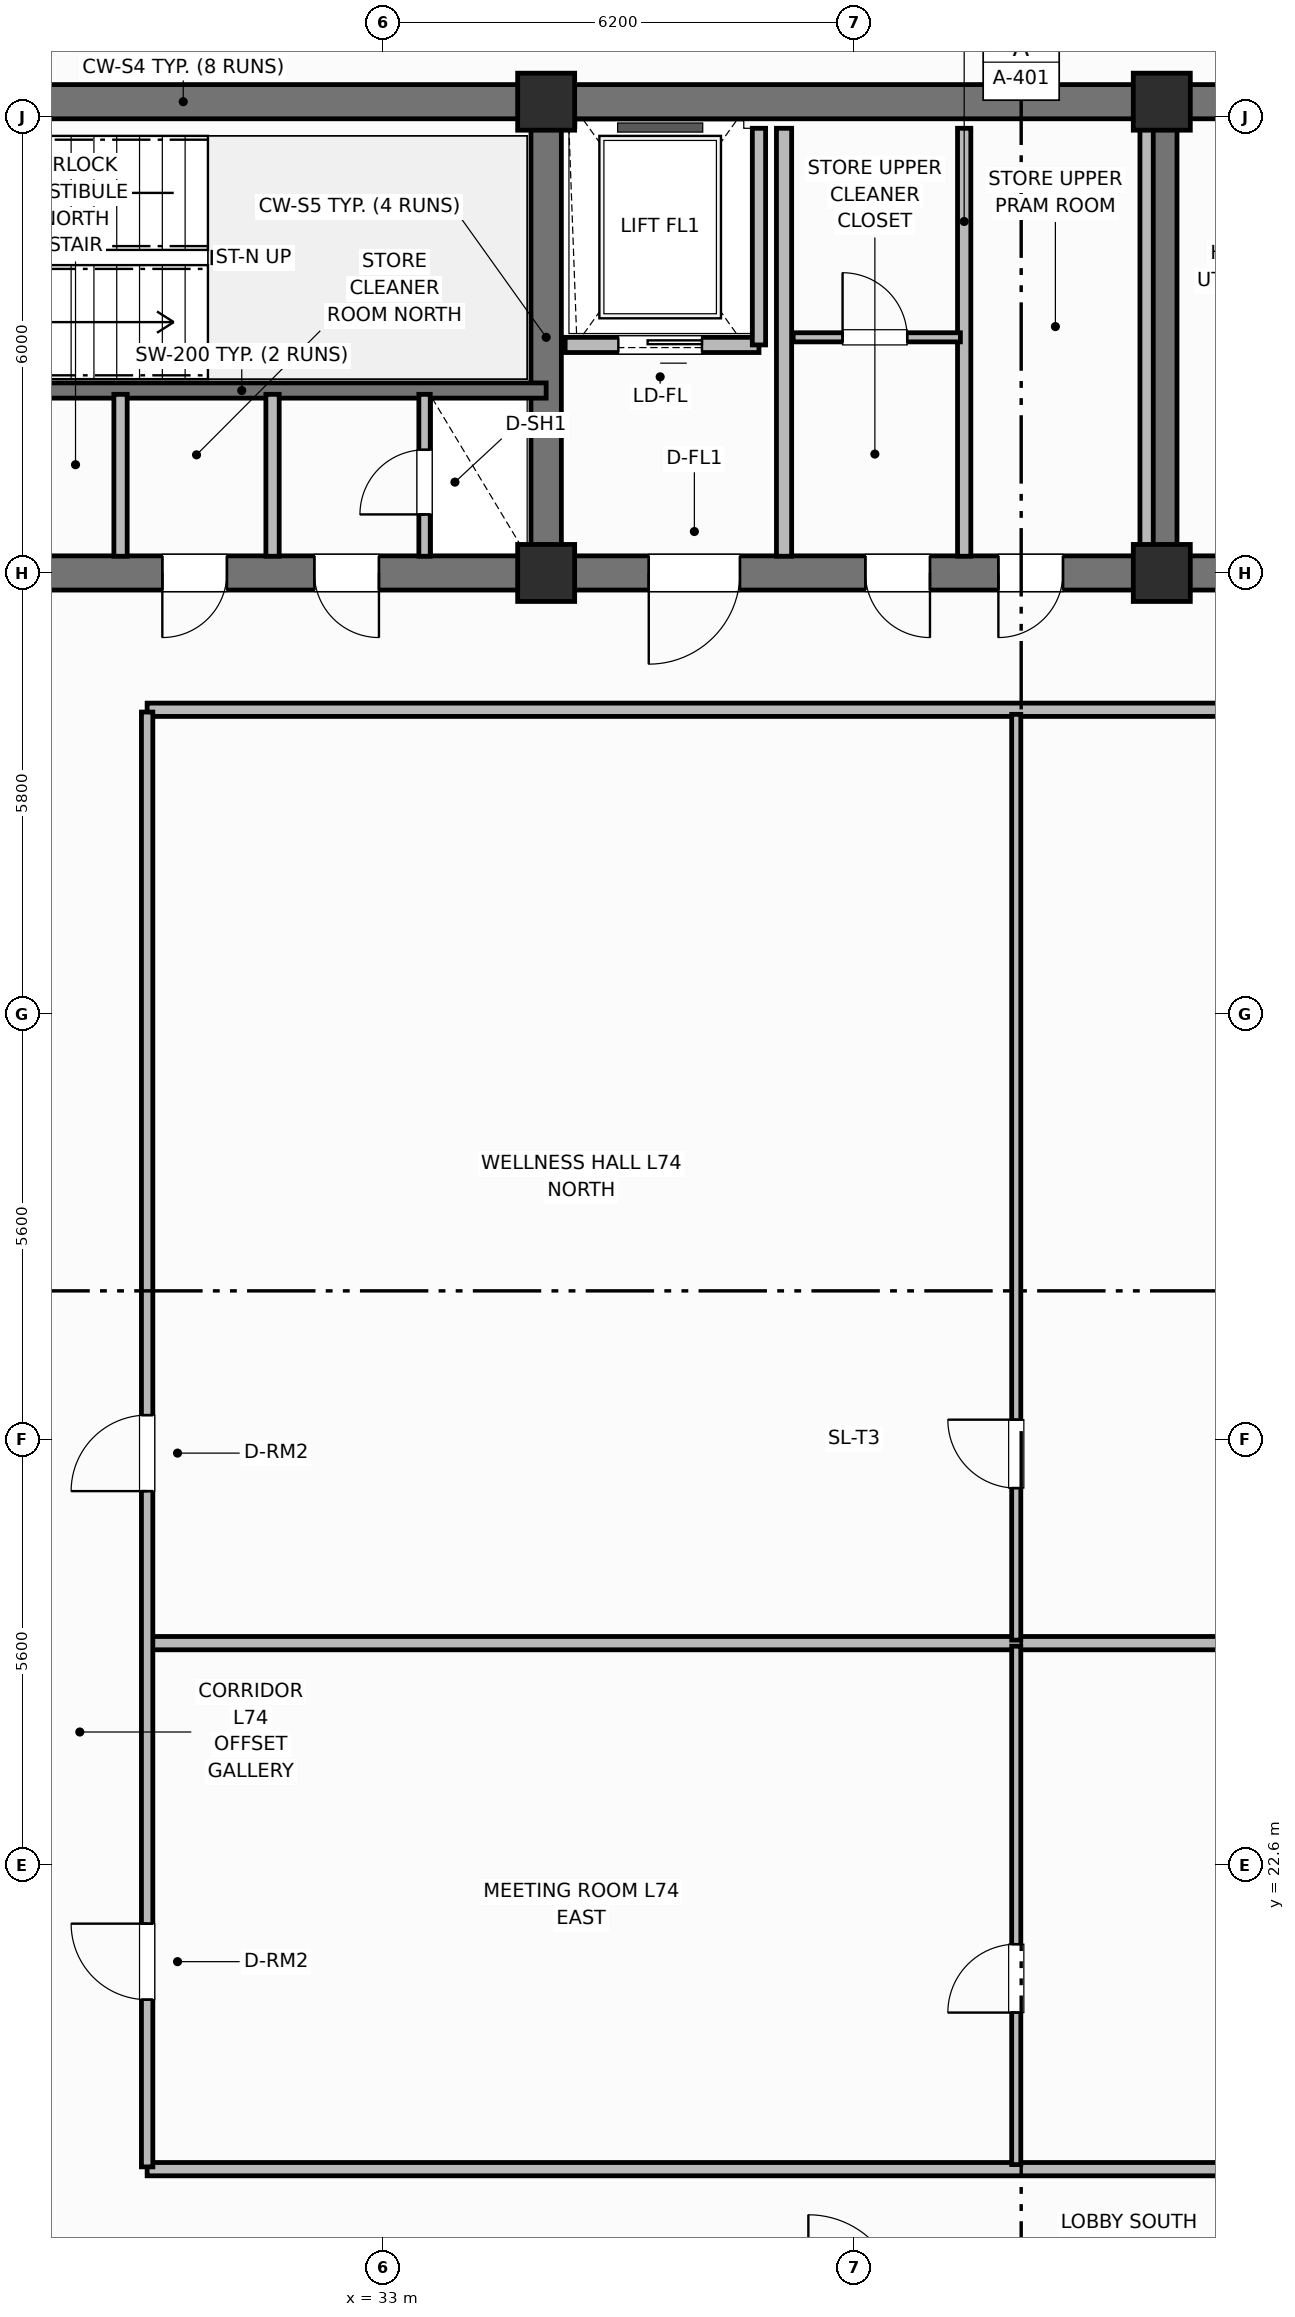
"""IFC4 building model, lengths in metres.
Left out: names, types, materials, properties, quantities, classifications, styles, units other than length and angle.
Written with IfcOpenShell. Run it as: python <this file> out.ifc"""

import sys

from ifc_helpers import new_model, si_unit, direction, frame, frame_2d, origin, origin_2d, place, context, subcontext, project, spatial, rectangle, extrude, element, fill, save


model = new_model("IFC4")
c1 = context("Model", 3, precision=1e-05, world=origin(), true_north=direction((0.0, 1.0)))
c2 = subcontext(c1, "Body", "Model", "MODEL_VIEW")
j1 = project(units=[si_unit("LENGTHUNIT", "METRE"), si_unit("PLANEANGLEUNIT", "RADIAN")], contexts=[c1])
p1 = place(None, origin())
s1 = spatial("IfcSite", under=j1, at=p1, CompositionType="ELEMENT")
p2 = place(p1, origin())
s2 = spatial("IfcBuilding", under=s1, at=p2, CompositionType="ELEMENT")
p3 = place(p2, frame((0.0, 0.0, 293.5)))
s3 = spatial("IfcBuildingStorey", under=s2, at=p3, CompositionType="ELEMENT", Elevation=293.5)
p4 = place(p3, frame((25.6, 45.8, 0.0), z_axis=(0.0, 0.0, 1.0), x_axis=(1.0, 0.0, 0.0)))
e1 = element("IfcWall", 1, at=p4, inside=s3, PredefinedType="SHEAR", context=c2, shape_type="SweptSolid", body=[
    extrude(rectangle(XDim=27.2, YDim=0.45, at=frame_2d((13.6, 0.0))), origin(), (0.0, 0.0, 1.0), 3.7),
])
p5 = place(p3, frame((52.8, 39.6, 0.0), z_axis=(0.0, 0.0, 1.0), x_axis=(-1.0, 0.0, 0.0)))
e2 = element("IfcWall", 2, at=p5, inside=s3, PredefinedType="SHEAR", context=c2, shape_type="SweptSolid", body=[
    extrude(rectangle(XDim=27.2, YDim=0.45, at=frame_2d((13.6, 0.0))), origin(), (0.0, 0.0, 1.0), 3.7),
])
p6 = place(p5, frame((24.3, 0.0, 0.0)))
e3 = element("IfcOpeningElement", 3, at=p6, cuts=e2, PredefinedType="OPENING", context=c2, shape_type="SweptSolid", body=[
    extrude(rectangle(XDim=1.1, YDim=2.15, at=frame_2d((0.55, 1.075))), frame((0.0, 0.235, 0.0), z_axis=(0.0, -1.0, 0.0), x_axis=(1.0, 0.0, 0.0)), (0.0, 0.0, 1.0), 0.47),
])
p7 = place(p5, frame((21.85, 0.0, 0.0)))
e4 = element("IfcOpeningElement", 4, at=p7, cuts=e2, PredefinedType="OPENING", context=c2, shape_type="SweptSolid", body=[
    extrude(rectangle(XDim=0.85, YDim=2.1, at=frame_2d((0.425, 1.05))), frame((0.0, 0.235, 0.0), z_axis=(0.0, -1.0, 0.0), x_axis=(1.0, 0.0, 0.0)), (0.0, 0.0, 1.0), 0.47),
])
p8 = place(p5, frame((19.85, 0.0, 0.0)))
e5 = element("IfcOpeningElement", 5, at=p8, cuts=e2, PredefinedType="OPENING", context=c2, shape_type="SweptSolid", body=[
    extrude(rectangle(XDim=0.85, YDim=2.1, at=frame_2d((0.425, 1.05))), frame((0.0, 0.235, 0.0), z_axis=(0.0, -1.0, 0.0), x_axis=(1.0, 0.0, 0.0)), (0.0, 0.0, 1.0), 0.47),
])
p9 = place(p5, frame((15.1, 0.0, 0.0)))
e6 = element("IfcOpeningElement", 6, at=p9, cuts=e2, PredefinedType="OPENING", context=c2, shape_type="SweptSolid", body=[
    extrude(rectangle(XDim=1.2, YDim=2.15, at=frame_2d((0.6, 1.075))), frame((0.0, 0.235, 0.0), z_axis=(0.0, -1.0, 0.0), x_axis=(1.0, 0.0, 0.0)), (0.0, 0.0, 1.0), 0.47),
])
p10 = place(p5, frame((12.6, 0.0, 0.0)))
e7 = element("IfcOpeningElement", 7, at=p10, cuts=e2, PredefinedType="OPENING", context=c2, shape_type="SweptSolid", body=[
    extrude(rectangle(XDim=0.85, YDim=2.1, at=frame_2d((0.425, 1.05))), frame((0.0, 0.235, 0.0), z_axis=(0.0, -1.0, 0.0), x_axis=(1.0, 0.0, 0.0)), (0.0, 0.0, 1.0), 0.47),
])
p11 = place(p5, frame((10.85, 0.0, 0.0)))
e8 = element("IfcOpeningElement", 8, at=p11, cuts=e2, PredefinedType="OPENING", context=c2, shape_type="SweptSolid", body=[
    extrude(rectangle(XDim=0.85, YDim=2.1, at=frame_2d((0.425, 1.05))), frame((0.0, 0.235, 0.0), z_axis=(0.0, -1.0, 0.0), x_axis=(1.0, 0.0, 0.0)), (0.0, 0.0, 1.0), 0.47),
])
p12 = place(p5, frame((7.35, 0.0, 0.0)))
e9 = element("IfcOpeningElement", 9, at=p12, cuts=e2, PredefinedType="OPENING", context=c2, shape_type="SweptSolid", body=[
    extrude(rectangle(XDim=0.85, YDim=2.1, at=frame_2d((0.425, 1.05))), frame((0.0, 0.235, 0.0), z_axis=(0.0, -1.0, 0.0), x_axis=(1.0, 0.0, 0.0)), (0.0, 0.0, 1.0), 0.47),
])
p13 = place(p5, frame((4.2, 0.0, 0.0)))
e10 = element("IfcOpeningElement", 10, at=p13, cuts=e2, PredefinedType="OPENING", context=c2, shape_type="SweptSolid", body=[
    extrude(rectangle(XDim=1.3, YDim=2.2, at=frame_2d((0.65, 1.1))), frame((0.0, 0.235, 0.0), z_axis=(0.0, -1.0, 0.0), x_axis=(1.0, 0.0, 0.0)), (0.0, 0.0, 1.0), 0.47),
])
for number, where, z_axis, x_axis in (
    (11, (35.15, 39.825, 0.0), (0.0, 0.0, 1.0), (0.0, 1.0, 0.0)),
    (12, (43.25, 39.825, 0.0), (0.0, 0.0, 1.0), (0.0, 1.0, 0.0)),
):
    element("IfcWall", number, at=place(p3, frame(where, z_axis=z_axis, x_axis=x_axis)), inside=s3, PredefinedType="SHEAR", context=c2, shape_type="SweptSolid", body=[
        extrude(rectangle(XDim=5.75, YDim=0.4, at=frame_2d((2.875, 0.0))), origin(), (0.0, 0.0, 1.0), 3.7),
    ])
for number, where, z_axis, x_axis in (
    (13, (35.15, 39.6, 0.0), (0.0, 0.0, 1.0), (1.0, 0.0, 0.0)),
    (14, (35.15, 45.8, 0.0), (0.0, 0.0, 1.0), (1.0, 0.0, 0.0)),
    (15, (43.25, 39.6, 0.0), (0.0, 0.0, 1.0), (1.0, 0.0, 0.0)),
    (16, (43.25, 45.8, 0.0), (0.0, 0.0, 1.0), (1.0, 0.0, 0.0)),
):
    element("IfcColumn", number, at=place(p3, frame(where, z_axis=z_axis, x_axis=x_axis)), inside=s3, PredefinedType="COLUMN", context=c2, shape_type="SweptSolid", body=[
        extrude(rectangle(XDim=0.75, YDim=0.75, at=origin_2d()), origin(), (0.0, 0.0, 1.0), 3.7),
    ])
p14 = place(p3, frame((35.15, 42.0, 0.0), z_axis=(0.0, 0.0, 1.0), x_axis=(-1.0, 0.0, 0.0)))
e17 = element("IfcWall", 17, at=p14, inside=s3, PredefinedType="SHEAR", context=c2, shape_type="SweptSolid", body=[
    extrude(rectangle(XDim=9.55, YDim=0.2, at=frame_2d((4.775, 0.0))), origin(), (0.0, 0.0, 1.0), 3.7),
])
p15 = place(p14, frame((7.25, 0.0, 0.0)))
e18 = element("IfcOpeningElement", 18, at=p15, cuts=e17, PredefinedType="OPENING", context=c2, shape_type="SweptSolid", body=[
    extrude(rectangle(XDim=1.1, YDim=2.15, at=frame_2d((0.55, 1.075))), frame((0.0, 0.11, 0.0), z_axis=(0.0, -1.0, 0.0), x_axis=(1.0, 0.0, 0.0)), (0.0, 0.0, 1.0), 0.22),
])
p16 = place(p3, frame((33.55, 39.82, 0.0), z_axis=(0.0, 0.0, 1.0), x_axis=(0.0, 1.0, 0.0)))
e19 = element("IfcWall", 19, at=p16, inside=s3, PredefinedType="PARTITIONING", context=c2, shape_type="SweptSolid", body=[
    extrude(rectangle(XDim=2.13, YDim=0.15, at=frame_2d((1.065, 0.0))), origin(), (0.0, 0.0, 1.0), 2.54),
])
p17 = place(p16, frame((0.55, 0.0, 0.0)))
e20 = element("IfcOpeningElement", 20, at=p17, cuts=e19, PredefinedType="OPENING", context=c2, shape_type="SweptSolid", body=[
    extrude(rectangle(XDim=0.85, YDim=2.05, at=frame_2d((0.425, 1.025))), frame((0.0, 0.085, 0.0), z_axis=(0.0, -1.0, 0.0), x_axis=(1.0, 0.0, 0.0)), (0.0, 0.0, 1.0), 0.17),
])
for number, where, z_axis, x_axis in (
    (21, (29.55, 39.82, 0.0), (0.0, 0.0, 1.0), (0.0, 1.0, 0.0)),
    (22, (31.55, 39.82, 0.0), (0.0, 0.0, 1.0), (0.0, 1.0, 0.0)),
):
    element("IfcWall", number, at=place(p3, frame(where, z_axis=z_axis, x_axis=x_axis)), inside=s3, PredefinedType="PARTITIONING", context=c2, shape_type="SweptSolid", body=[
        extrude(rectangle(XDim=2.13, YDim=0.175, at=frame_2d((1.065, 0.0))), origin(), (0.0, 0.0, 1.0), 2.54),
    ])
p18 = place(p3, frame((37.95, 42.6, 0.0), z_axis=(0.0, 0.0, 1.0), x_axis=(-1.0, 0.0, 0.0)))
e23 = element("IfcWall", 23, at=p18, inside=s3, PredefinedType="PARTITIONING", context=c2, shape_type="SweptSolid", body=[
    extrude(rectangle(XDim=2.55, YDim=0.2, at=frame_2d((1.275, 0.0))), origin(), (0.0, 0.0, 1.0), 2.31),
])
p19 = place(p18, frame((0.75, 0.0, 0.0)))
e24 = element("IfcOpeningElement", 24, at=p19, cuts=e23, PredefinedType="OPENING", context=c2, shape_type="SweptSolid", body=[
    extrude(rectangle(XDim=1.1, YDim=2.15, at=frame_2d((0.55, 1.075))), frame((0.0, 0.11, 0.0), z_axis=(0.0, -1.0, 0.0), x_axis=(1.0, 0.0, 0.0)), (0.0, 0.0, 1.0), 0.22),
])
p20 = place(p3, frame((37.95, 42.6, 0.0), z_axis=(0.0, 0.0, 1.0), x_axis=(0.0, 1.0, 0.0)))
e25 = element("IfcWall", 25, at=p20, inside=s3, PredefinedType="PARTITIONING", context=c2, shape_type="SweptSolid", body=[
    extrude(rectangle(XDim=2.85, YDim=0.175, at=frame_2d((1.425, 0.0))), origin(), (0.0, 0.0, 1.0), 2.54),
])
p21 = place(p3, frame((38.28, 39.82, 0.0), z_axis=(0.0, 0.0, 1.0), x_axis=(0.0, 1.0, 0.0)))
e26 = element("IfcWall", 26, at=p21, inside=s3, PredefinedType="PARTITIONING", context=c2, shape_type="SweptSolid", body=[
    extrude(rectangle(XDim=5.63, YDim=0.2, at=frame_2d((2.815, 0.0))), origin(), (0.0, 0.0, 1.0), 2.54),
])
for number, where, z_axis, x_axis in (
    (27, (43.05, 39.82, 0.0), (0.0, 0.0, 1.0), (0.0, 1.0, 0.0)),
    (28, (40.65, 39.82, 0.0), (0.0, 0.0, 1.0), (0.0, 1.0, 0.0)),
):
    element("IfcWall", number, at=place(p3, frame(where, z_axis=z_axis, x_axis=x_axis)), inside=s3, PredefinedType="PARTITIONING", context=c2, shape_type="SweptSolid", body=[
        extrude(rectangle(XDim=5.63, YDim=0.175, at=frame_2d((2.815, 0.0))), origin(), (0.0, 0.0, 1.0), 2.54),
    ])
p22 = place(p3, frame((38.4, 42.7, 0.0), z_axis=(0.0, 0.0, 1.0), x_axis=(1.0, 0.0, 0.0)))
e29 = element("IfcWall", 29, at=p22, inside=s3, PredefinedType="PARTITIONING", context=c2, shape_type="SweptSolid", body=[
    extrude(rectangle(XDim=2.2, YDim=0.12, at=frame_2d((1.1, 0.0))), origin(), (0.0, 0.0, 1.0), 2.31),
])
p23 = place(p22, frame((0.65, 0.0, 0.0)))
e30 = element("IfcOpeningElement", 30, at=p23, cuts=e29, PredefinedType="OPENING", context=c2, shape_type="SweptSolid", body=[
    extrude(rectangle(XDim=0.85, YDim=2.1, at=frame_2d((0.425, 1.05))), frame((0.0, 0.07, 0.0), z_axis=(0.0, -1.0, 0.0), x_axis=(1.0, 0.0, 0.0)), (0.0, 0.0, 1.0), 0.14),
])
for number, where, z_axis, x_axis in (
    (31, (29.9, 18.6, 0.0), (0.0, 0.0, 1.0), (1.0, 0.0, 0.0)),
    (32, (29.9, 37.8, 0.0), (0.0, 0.0, 1.0), (1.0, 0.0, 0.0)),
):
    element("IfcWall", number, at=place(p3, frame(where, z_axis=z_axis, x_axis=x_axis)), inside=s3, PredefinedType="PARTITIONING", context=c2, shape_type="SweptSolid", body=[
        extrude(rectangle(XDim=22.95, YDim=0.175, at=frame_2d((11.475, 0.0))), origin(), (0.0, 0.0, 1.0), 2.54),
    ])
p24 = place(p3, frame((29.93, 25.521, 0.0), z_axis=(0.0, 0.0, 1.0), x_axis=(1.0, 0.0, 0.0)))
e33 = element("IfcWall", 33, at=p24, inside=s3, PredefinedType="PARTITIONING", context=c2, shape_type="SweptSolid", body=[
    extrude(rectangle(XDim=22.87, YDim=0.175, at=frame_2d((11.435, 0.0))), origin(), (0.0, 0.0, 1.0), 2.54),
])
p25 = place(p3, frame((41.335, 18.66, 0.0), z_axis=(0.0, 0.0, 1.0), x_axis=(0.0, 1.0, 0.0)))
e34 = element("IfcWall", 34, at=p25, inside=s3, PredefinedType="PARTITIONING", context=c2, shape_type="SweptSolid", body=[
    extrude(rectangle(XDim=6.821, YDim=0.12, at=frame_2d((3.41, 0.0))), origin(), (0.0, 0.0, 1.0), 2.54),
])
p26 = place(p25, frame((2.0, 0.0, 0.0)))
e35 = element("IfcOpeningElement", 35, at=p26, cuts=e34, PredefinedType="OPENING", context=c2, shape_type="SweptSolid", body=[
    extrude(rectangle(XDim=0.9, YDim=2.1, at=frame_2d((0.45, 1.05))), frame((0.0, 0.07, 0.0), z_axis=(0.0, -1.0, 0.0), x_axis=(1.0, 0.0, 0.0)), (0.0, 0.0, 1.0), 0.14),
])
p27 = place(p3, frame((41.335, 25.56, 0.0), z_axis=(0.0, 0.0, 1.0), x_axis=(0.0, 1.0, 0.0)))
e36 = element("IfcWall", 36, at=p27, inside=s3, PredefinedType="PARTITIONING", context=c2, shape_type="SweptSolid", body=[
    extrude(rectangle(XDim=12.18, YDim=0.12, at=frame_2d((6.09, 0.0))), origin(), (0.0, 0.0, 1.0), 2.54),
])
p28 = place(p27, frame((2.0, 0.0, 0.0)))
e37 = element("IfcOpeningElement", 37, at=p28, cuts=e36, PredefinedType="OPENING", context=c2, shape_type="SweptSolid", body=[
    extrude(rectangle(XDim=0.9, YDim=2.1, at=frame_2d((0.45, 1.05))), frame((0.0, 0.07, 0.0), z_axis=(0.0, -1.0, 0.0), x_axis=(1.0, 0.0, 0.0)), (0.0, 0.0, 1.0), 0.14),
])
p29 = place(p3, frame((29.9, 18.63, 0.0), z_axis=(0.0, 0.0, 1.0), x_axis=(0.0, 1.0, 0.0)))
e38 = element("IfcWall", 38, at=p29, inside=s3, PredefinedType="PARTITIONING", context=c2, shape_type="SweptSolid", body=[
    extrude(rectangle(XDim=19.14, YDim=0.15, at=frame_2d((9.57, 0.0))), origin(), (0.0, 0.0, 1.0), 2.54),
])
p30 = place(p29, frame((2.2, 0.0, 0.0)))
e39 = element("IfcOpeningElement", 39, at=p30, cuts=e38, PredefinedType="OPENING", context=c2, shape_type="SweptSolid", body=[
    extrude(rectangle(XDim=1.0, YDim=2.15, at=frame_2d((0.5, 1.075))), frame((0.0, 0.085, 0.0), z_axis=(0.0, -1.0, 0.0), x_axis=(1.0, 0.0, 0.0)), (0.0, 0.0, 1.0), 0.17),
])
p31 = place(p29, frame((8.89, 0.0, 0.0)))
e40 = element("IfcOpeningElement", 40, at=p31, cuts=e38, PredefinedType="OPENING", context=c2, shape_type="SweptSolid", body=[
    extrude(rectangle(XDim=1.0, YDim=2.15, at=frame_2d((0.5, 1.075))), frame((0.0, 0.085, 0.0), z_axis=(0.0, -1.0, 0.0), x_axis=(1.0, 0.0, 0.0)), (0.0, 0.0, 1.0), 0.17),
])
p32 = place(p17, origin())
e41 = element("IfcDoor", 41, at=p32, inside=s3, OperationType="SINGLE_SWING_LEFT", PredefinedType="TRAPDOOR", context=c2, shape_type="SweptSolid", body=[
    extrude(rectangle(XDim=0.85, YDim=2.05, at=frame_2d((0.425, 1.025))), frame((0.0, 0.025, 0.0), z_axis=(0.0, -1.0, 0.0), x_axis=(1.0, 0.0, 0.0)), (0.0, 0.0, 1.0), 0.05),
])
fill(e20, e41)
p33 = place(p19, origin())
e42 = element("IfcDoor", 42, at=p33, inside=s3, OperationType="SLIDING_TO_LEFT", PredefinedType="DOOR", context=c2, shape_type="SweptSolid", body=[
    extrude(rectangle(XDim=1.1, YDim=2.15, at=frame_2d((0.55, 1.075))), frame((0.0, 0.025, 0.0), z_axis=(0.0, -1.0, 0.0), x_axis=(1.0, 0.0, 0.0)), (0.0, 0.0, 1.0), 0.05),
])
fill(e24, e42)
p34 = place(p23, origin())
e43 = element("IfcDoor", 43, at=p34, inside=s3, OperationType="SINGLE_SWING_LEFT", PredefinedType="DOOR", context=c2, shape_type="SweptSolid", body=[
    extrude(rectangle(XDim=0.85, YDim=2.1, at=frame_2d((0.425, 1.05))), frame((0.0, 0.025, 0.0), z_axis=(0.0, -1.0, 0.0), x_axis=(1.0, 0.0, 0.0)), (0.0, 0.0, 1.0), 0.05),
])
fill(e30, e43)
p35 = place(p26, origin())
e44 = element("IfcDoor", 44, at=p35, inside=s3, OperationType="SINGLE_SWING_LEFT", PredefinedType="DOOR", context=c2, shape_type="SweptSolid", body=[
    extrude(rectangle(XDim=0.9, YDim=2.1, at=frame_2d((0.45, 1.05))), frame((0.0, 0.025, 0.0), z_axis=(0.0, -1.0, 0.0), x_axis=(1.0, 0.0, 0.0)), (0.0, 0.0, 1.0), 0.05),
])
fill(e35, e44)
p36 = place(p28, origin())
e45 = element("IfcDoor", 45, at=p36, inside=s3, OperationType="SINGLE_SWING_RIGHT", PredefinedType="DOOR", context=c2, shape_type="SweptSolid", body=[
    extrude(rectangle(XDim=0.9, YDim=2.1, at=frame_2d((0.45, 1.05))), frame((0.0, 0.025, 0.0), z_axis=(0.0, -1.0, 0.0), x_axis=(1.0, 0.0, 0.0)), (0.0, 0.0, 1.0), 0.05),
])
fill(e37, e45)
p37 = place(p30, origin())
e46 = element("IfcDoor", 46, at=p37, inside=s3, OperationType="SINGLE_SWING_RIGHT", PredefinedType="DOOR", context=c2, shape_type="SweptSolid", body=[
    extrude(rectangle(XDim=1.0, YDim=2.15, at=frame_2d((0.5, 1.075))), frame((0.0, 0.025, 0.0), z_axis=(0.0, -1.0, 0.0), x_axis=(1.0, 0.0, 0.0)), (0.0, 0.0, 1.0), 0.05),
])
fill(e39, e46)
p38 = place(p31, origin())
e47 = element("IfcDoor", 47, at=p38, inside=s3, OperationType="SINGLE_SWING_LEFT", PredefinedType="DOOR", context=c2, shape_type="SweptSolid", body=[
    extrude(rectangle(XDim=1.0, YDim=2.15, at=frame_2d((0.5, 1.075))), frame((0.0, 0.025, 0.0), z_axis=(0.0, -1.0, 0.0), x_axis=(1.0, 0.0, 0.0)), (0.0, 0.0, 1.0), 0.05),
])
fill(e40, e47)
p39 = place(p7, origin())
e48 = element("IfcDoor", 48, at=p39, inside=s3, OperationType="SINGLE_SWING_RIGHT", PredefinedType="DOOR", context=c2, shape_type="SweptSolid", body=[
    extrude(rectangle(XDim=0.85, YDim=2.1, at=frame_2d((0.425, 1.05))), frame((0.0, 0.025, 0.0), z_axis=(0.0, -1.0, 0.0), x_axis=(1.0, 0.0, 0.0)), (0.0, 0.0, 1.0), 0.05),
])
fill(e4, e48)
p40 = place(p8, origin())
e49 = element("IfcDoor", 49, at=p40, inside=s3, OperationType="SINGLE_SWING_LEFT", PredefinedType="DOOR", context=c2, shape_type="SweptSolid", body=[
    extrude(rectangle(XDim=0.85, YDim=2.1, at=frame_2d((0.425, 1.05))), frame((0.0, 0.025, 0.0), z_axis=(0.0, -1.0, 0.0), x_axis=(1.0, 0.0, 0.0)), (0.0, 0.0, 1.0), 0.05),
])
fill(e5, e49)
p41 = place(p9, origin())
e50 = element("IfcDoor", 50, at=p41, inside=s3, OperationType="SINGLE_SWING_RIGHT", PredefinedType="DOOR", context=c2, shape_type="SweptSolid", body=[
    extrude(rectangle(XDim=1.2, YDim=2.15, at=frame_2d((0.6, 1.075))), frame((0.0, 0.025, 0.0), z_axis=(0.0, -1.0, 0.0), x_axis=(1.0, 0.0, 0.0)), (0.0, 0.0, 1.0), 0.05),
])
fill(e6, e50)
p42 = place(p10, origin())
e51 = element("IfcDoor", 51, at=p42, inside=s3, OperationType="SINGLE_SWING_LEFT", PredefinedType="DOOR", context=c2, shape_type="SweptSolid", body=[
    extrude(rectangle(XDim=0.85, YDim=2.1, at=frame_2d((0.425, 1.05))), frame((0.0, 0.025, 0.0), z_axis=(0.0, -1.0, 0.0), x_axis=(1.0, 0.0, 0.0)), (0.0, 0.0, 1.0), 0.05),
])
fill(e7, e51)
p43 = place(p11, origin())
e52 = element("IfcDoor", 52, at=p43, inside=s3, OperationType="SINGLE_SWING_RIGHT", PredefinedType="DOOR", context=c2, shape_type="SweptSolid", body=[
    extrude(rectangle(XDim=0.85, YDim=2.1, at=frame_2d((0.425, 1.05))), frame((0.0, 0.025, 0.0), z_axis=(0.0, -1.0, 0.0), x_axis=(1.0, 0.0, 0.0)), (0.0, 0.0, 1.0), 0.05),
])
fill(e8, e52)
save(model, sys.argv[1])
